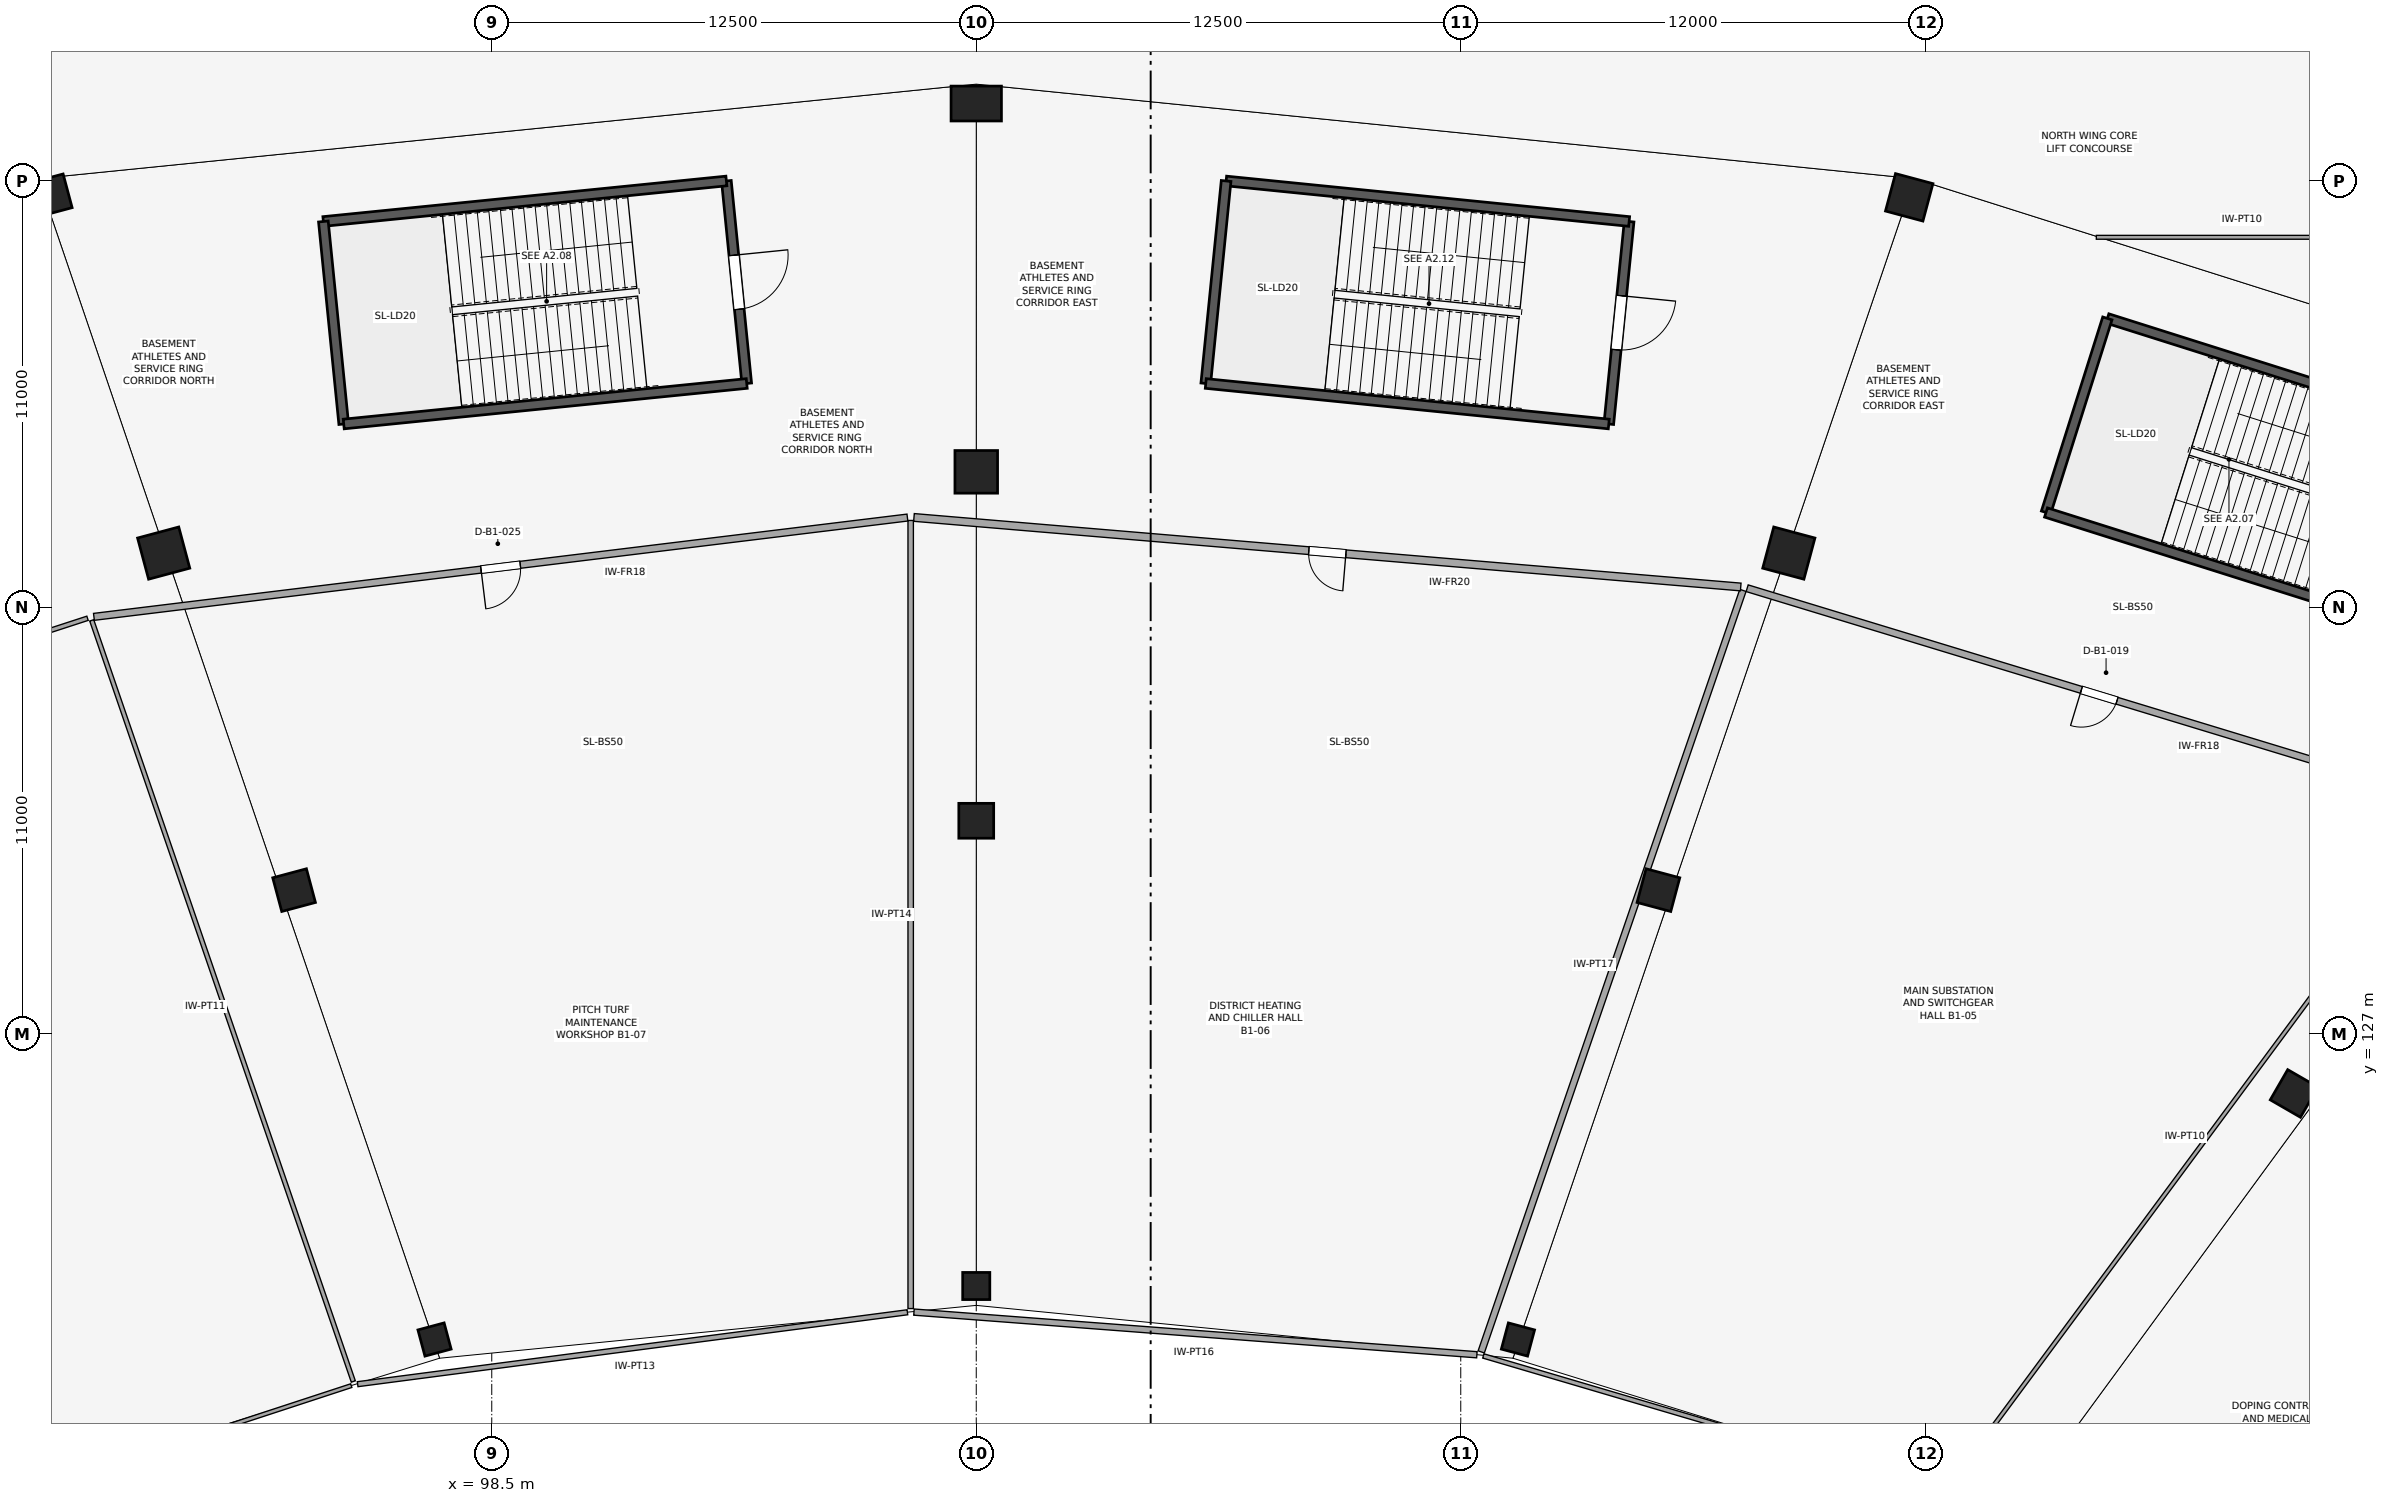
"""IFC4 building model, lengths in metres.
Left out: names, types, materials, properties, quantities, classifications, styles, units other than length and angle.
Written with IfcOpenShell. Run it as: python <this file> out.ifc"""

import sys

from ifc_helpers import new_model, si_unit, direction, frame, frame_2d, origin, origin_2d, place, context, subcontext, project, spatial, rectangle, extrude, element, fill, save


model = new_model("IFC4")
c1 = context("Model", 3, precision=1e-05, world=origin(), true_north=direction((0.0, 1.0)))
c2 = subcontext(c1, "Body", "Model", "MODEL_VIEW")
j1 = project(units=[si_unit("LENGTHUNIT", "METRE"), si_unit("PLANEANGLEUNIT", "RADIAN")], contexts=[c1])
p1 = place(None, origin())
s1 = spatial("IfcSite", under=j1, at=p1, CompositionType="ELEMENT")
p2 = place(p1, origin())
s2 = spatial("IfcBuilding", under=s1, at=p2, CompositionType="ELEMENT")
p3 = place(p2, frame((0.0, 0.0, -5.4)))
s3 = spatial("IfcBuildingStorey", under=s2, at=p3, CompositionType="ELEMENT", Elevation=-5.4)
for number, where, z_axis, x_axis in (
    (1, (124.976, 119.12, 0.0), (0.0, 0.0, 1.0), (0.259, 0.966, 0.0)),
    (2, (111.0, 120.5, 0.0), (0.0, 0.0, 1.0), (0.0, 1.0, 0.0)),
    (3, (97.024, 119.12, 0.0), (0.0, 0.0, 1.0), (-0.259, 0.966, 0.0)),
):
    element("IfcColumn", number, at=place(p3, frame(where, z_axis=z_axis, x_axis=x_axis)), inside=s3, PredefinedType="COLUMN", context=c2, shape_type="SweptSolid", body=[
        extrude(rectangle(XDim=0.7, YDim=0.7, at=origin_2d()), origin(), (0.0, 0.0, 1.0), 5.4),
    ])
for number, where, z_axis, x_axis in (
    (4, (145.0, 125.466, 0.0), (0.0, 0.0, 1.0), (0.5, 0.866, 0.0)),
    (5, (128.6, 130.711, 0.0), (0.0, 0.0, 1.0), (0.259, 0.966, 0.0)),
    (6, (111.0, 132.5, 0.0), (0.0, 0.0, 1.0), (0.0, 1.0, 0.0)),
    (7, (93.4, 130.711, 0.0), (0.0, 0.0, 1.0), (-0.259, 0.966, 0.0)),
):
    element("IfcColumn", number, at=place(p3, frame(where, z_axis=z_axis, x_axis=x_axis)), inside=s3, PredefinedType="COLUMN", context=c2, shape_type="SweptSolid", body=[
        extrude(rectangle(XDim=0.9, YDim=0.9, at=origin_2d()), origin(), (0.0, 0.0, 1.0), 5.4),
    ])
for number, where, z_axis, x_axis in (
    (8, (131.964, 139.404, 0.0), (0.0, 0.0, 1.0), (0.259, 0.966, 0.0)),
    (9, (111.0, 141.5, 0.0), (0.0, 0.0, 1.0), (0.0, 1.0, 0.0)),
    (10, (90.036, 139.404, 0.0), (0.0, 0.0, 1.0), (-0.259, 0.966, 0.0)),
):
    element("IfcColumn", number, at=place(p3, frame(where, z_axis=z_axis, x_axis=x_axis)), inside=s3, PredefinedType="COLUMN", context=c2, shape_type="SweptSolid", body=[
        extrude(rectangle(XDim=1.1, YDim=1.1, at=origin_2d()), origin(), (0.0, 0.0, 1.0), 5.4),
    ])
p4 = place(p3, frame((135.07, 148.581, 0.0), z_axis=(0.0, 0.0, 1.0), x_axis=(0.258819045103, 0.965925826289, 0.0)))
e11 = element("IfcColumn", 11, at=p4, inside=s3, PredefinedType="COLUMN", context=c2, shape_type="SweptSolid", body=[
    extrude(rectangle(XDim=1.0, YDim=1.0, at=origin_2d()), origin(), (0.0, 0.0, 1.0), 5.4),
])
for number, where, z_axis, x_axis in (
    (12, (111.0, 151.0, 0.0), (0.0, 0.0, 1.0), (0.0, 1.0, 0.0)),
    (13, (86.93, 148.581, 0.0), (0.0, 0.0, 1.0), (-0.259, 0.966, 0.0)),
):
    element("IfcColumn", number, at=place(p3, frame(where, z_axis=z_axis, x_axis=x_axis)), inside=s3, PredefinedType="COLUMN", context=c2, shape_type="SweptSolid", body=[
        extrude(rectangle(XDim=0.9, YDim=1.3, at=origin_2d()), origin(), (0.0, 0.0, 1.0), 5.4),
    ])
p5 = place(p3, frame((150.146, 142.307, 0.0), z_axis=(0.0, 0.0, 1.0), x_axis=(-0.953461834254, 0.301513732061, 0.0)))
e14 = element("IfcWall", 14, at=p5, inside=s3, PredefinedType="SHEAR", context=c2, shape_type="SweptSolid", body=[
    extrude(rectangle(XDim=10.45, YDim=0.25, at=frame_2d((5.225, 0.0))), origin(), (0.0, 0.0, 1.0), 5.05),
])
p6 = place(p3, frame((140.182, 145.458, 0.0), z_axis=(0.0, 0.0, 1.0), x_axis=(-0.301485222482, -0.953470849384, 0.0)))
e15 = element("IfcWall", 15, at=p6, inside=s3, PredefinedType="SHEAR", context=c2, shape_type="SweptSolid", body=[
    extrude(rectangle(XDim=5.25, YDim=0.25, at=frame_2d((2.625, 0.0))), origin(), (0.0, 0.0, 1.0), 5.05),
])
p7 = place(p3, frame((138.6, 140.452, 0.0), z_axis=(0.0, 0.0, 1.0), x_axis=(0.953459710305, -0.301520448438, 0.0)))
e16 = element("IfcWall", 16, at=p7, inside=s3, PredefinedType="SHEAR", context=c2, shape_type="SweptSolid", body=[
    extrude(rectangle(XDim=10.45, YDim=0.25, at=frame_2d((5.225, 0.0))), origin(), (0.0, 0.0, 1.0), 5.05),
])
p8 = place(p3, frame((105.079, 143.779, 0.0), z_axis=(0.0, 0.0, 1.0), x_axis=(-0.100028593886, 0.994984562898, 0.0)))
e17 = element("IfcWall", 17, at=p8, inside=s3, PredefinedType="SHEAR", context=c2, shape_type="SweptSolid", body=[
    extrude(rectangle(XDim=5.25, YDim=0.25, at=frame_2d((2.625, 0.0))), origin(), (0.0, 0.0, 1.0), 5.05),
])
p9 = place(p8, frame((1.925, 0.0, 0.0)))
e18 = element("IfcOpeningElement", 18, at=p9, cuts=e17, PredefinedType="OPENING", context=c2, shape_type="SweptSolid", body=[
    extrude(rectangle(XDim=1.4, YDim=2.2, at=frame_2d((0.7, 1.1))), frame((0.0, 0.135, 0.0), z_axis=(0.0, -1.0, 0.0), x_axis=(1.0, 0.0, 0.0)), (0.0, 0.0, 1.0), 0.27),
])
p10 = place(p3, frame((104.553, 149.003, 0.0), z_axis=(0.0, 0.0, 1.0), x_axis=(-0.994985938948, -0.100014905366, 0.0)))
e19 = element("IfcWall", 19, at=p10, inside=s3, PredefinedType="SHEAR", context=c2, shape_type="SweptSolid", body=[
    extrude(rectangle(XDim=10.45, YDim=0.25, at=frame_2d((5.225, 0.0))), origin(), (0.0, 0.0, 1.0), 5.05),
])
p11 = place(p3, frame((94.156, 147.958, 0.0), z_axis=(0.0, 0.0, 1.0), x_axis=(0.100028593886, -0.994984562898, 0.0)))
e20 = element("IfcWall", 20, at=p11, inside=s3, PredefinedType="SHEAR", context=c2, shape_type="SweptSolid", body=[
    extrude(rectangle(XDim=5.25, YDim=0.25, at=frame_2d((2.625, 0.0))), origin(), (0.0, 0.0, 1.0), 5.05),
])
p12 = place(p3, frame((94.681, 142.734, 0.0), z_axis=(0.0, 0.0, 1.0), x_axis=(0.994985938948, 0.100014905366, 0.0)))
e21 = element("IfcWall", 21, at=p12, inside=s3, PredefinedType="SHEAR", context=c2, shape_type="SweptSolid", body=[
    extrude(rectangle(XDim=10.45, YDim=0.25, at=frame_2d((5.225, 0.0))), origin(), (0.0, 0.0, 1.0), 5.05),
])
p13 = place(p3, frame((127.319, 142.734, 0.0), z_axis=(0.0, 0.0, 1.0), x_axis=(0.10002396577, 0.994985028165, 0.0)))
e22 = element("IfcWall", 22, at=p13, inside=s3, PredefinedType="SHEAR", context=c2, shape_type="SweptSolid", body=[
    extrude(rectangle(XDim=5.25, YDim=0.25, at=frame_2d((2.625, 0.0))), origin(), (0.0, 0.0, 1.0), 5.05),
])
p14 = place(p13, frame((1.925, 0.0, 0.0)))
e23 = element("IfcOpeningElement", 23, at=p14, cuts=e22, PredefinedType="OPENING", context=c2, shape_type="SweptSolid", body=[
    extrude(rectangle(XDim=1.4, YDim=2.2, at=frame_2d((0.7, 1.1))), frame((0.0, 0.135, 0.0), z_axis=(0.0, -1.0, 0.0), x_axis=(1.0, 0.0, 0.0)), (0.0, 0.0, 1.0), 0.27),
])
p15 = place(p3, frame((127.844, 147.958, 0.0), z_axis=(0.0, 0.0, 1.0), x_axis=(-0.994988263568, 0.09999177647, 0.0)))
e24 = element("IfcWall", 24, at=p15, inside=s3, PredefinedType="SHEAR", context=c2, shape_type="SweptSolid", body=[
    extrude(rectangle(XDim=10.45, YDim=0.25, at=frame_2d((5.225, 0.0))), origin(), (0.0, 0.0, 1.0), 5.05),
])
p16 = place(p3, frame((117.447, 149.003, 0.0), z_axis=(0.0, 0.0, 1.0), x_axis=(-0.099982555566, -0.994989190184, 0.0)))
e25 = element("IfcWall", 25, at=p16, inside=s3, PredefinedType="SHEAR", context=c2, shape_type="SweptSolid", body=[
    extrude(rectangle(XDim=5.25, YDim=0.25, at=frame_2d((2.625, 0.0))), origin(), (0.0, 0.0, 1.0), 5.05),
])
p17 = place(p3, frame((116.922, 143.779, 0.0), z_axis=(0.0, 0.0, 1.0), x_axis=(0.994985705245, -0.100017230303, 0.0)))
e26 = element("IfcWall", 26, at=p17, inside=s3, PredefinedType="SHEAR", context=c2, shape_type="SweptSolid", body=[
    extrude(rectangle(XDim=10.45, YDim=0.25, at=frame_2d((5.225, 0.0))), origin(), (0.0, 0.0, 1.0), 5.05),
])
p18 = place(p3, frame((136.033, 115.257, 0.0), z_axis=(0.0, 0.0, 1.0), x_axis=(0.595115459559, 0.803640211658, 0.0)))
e27 = element("IfcWall", 27, at=p18, inside=s3, PredefinedType="PARTITIONING", context=c2, shape_type="SweptSolid", body=[
    extrude(rectangle(XDim=21.93, YDim=0.1, at=frame_2d((10.965, 0.0))), origin(), (0.0, 0.0, 1.0), 3.8),
])
p19 = place(p3, frame((135.901, 115.212, 0.0), z_axis=(0.0, 0.0, 1.0), x_axis=(-0.959194951666, 0.28274554762, 0.0)))
e28 = element("IfcWall", 28, at=p19, inside=s3, PredefinedType="MOVABLE", context=c2, shape_type="SweptSolid", body=[
    extrude(rectangle(XDim=12.322, YDim=0.115, at=frame_2d((6.161, 0.0))), origin(), (0.0, 0.0, 1.0), 3.8),
])
p20 = place(p3, frame((149.054, 132.973, 0.0), z_axis=(0.0, 0.0, 1.0), x_axis=(-0.956723233709, 0.290999405637, 0.0)))
e29 = element("IfcWall", 29, at=p20, inside=s3, PredefinedType="PARTITIONING", context=c2, shape_type="SweptSolid", body=[
    extrude(rectangle(XDim=18.986, YDim=0.18, at=frame_2d((9.493, 0.0))), origin(), (0.0, 0.0, 1.0), 3.8),
])
p21 = place(p20, frame((9.013, 0.0, 0.0)))
e30 = element("IfcOpeningElement", 30, at=p21, cuts=e29, PredefinedType="OPENING", context=c2, shape_type="SweptSolid", body=[
    extrude(rectangle(XDim=0.96, YDim=2.1, at=frame_2d((0.48, 1.05))), frame((0.0, 0.1, 0.0), z_axis=(0.0, -1.0, 0.0), x_axis=(1.0, 0.0, 0.0)), (0.0, 0.0, 1.0), 0.2),
])
p22 = place(p3, frame((124.029, 118.801, 0.0), z_axis=(0.0, 0.0, 1.0), x_axis=(0.325086338783, 0.945684340748, 0.0)))
e31 = element("IfcWall", 31, at=p22, inside=s3, PredefinedType="PARTITIONING", context=c2, shape_type="SweptSolid", body=[
    extrude(rectangle(XDim=20.77, YDim=0.17, at=frame_2d((10.385, 0.0))), origin(), (0.0, 0.0, 1.0), 3.8),
])
p23 = place(p3, frame((123.916, 118.727, 0.0), z_axis=(0.0, 0.0, 1.0), x_axis=(-0.997142075801, 0.075549193687, 0.0)))
e32 = element("IfcWall", 32, at=p23, inside=s3, PredefinedType="PARTITIONING", context=c2, shape_type="SweptSolid", body=[
    extrude(rectangle(XDim=14.564, YDim=0.16, at=frame_2d((7.282, 0.0))), origin(), (0.0, 0.0, 1.0), 3.8),
])
p24 = place(p3, frame((130.723, 138.53, 0.0), z_axis=(0.0, 0.0, 1.0), x_axis=(-0.996481037388, 0.083818507065, 0.0)))
e33 = element("IfcWall", 33, at=p24, inside=s3, PredefinedType="PARTITIONING", context=c2, shape_type="SweptSolid", body=[
    extrude(rectangle(XDim=21.406, YDim=0.2, at=frame_2d((10.703, 0.0))), origin(), (0.0, 0.0, 1.0), 3.8),
])
p25 = place(p24, frame((10.223, 0.0, 0.0)))
e34 = element("IfcOpeningElement", 34, at=p25, cuts=e33, PredefinedType="OPENING", context=c2, shape_type="SweptSolid", body=[
    extrude(rectangle(XDim=0.96, YDim=2.38, at=frame_2d((0.48, 1.19))), frame((0.0, 0.11, 0.0), z_axis=(0.0, -1.0, 0.0), x_axis=(1.0, 0.0, 0.0)), (0.0, 0.0, 1.0), 0.22),
])
p26 = place(p3, frame((109.308, 119.918, 0.0), z_axis=(0.0, 0.0, 1.0), x_axis=(1.2010281e-05, 0.999999999928, 0.0)))
e35 = element("IfcWall", 35, at=p26, inside=s3, PredefinedType="PARTITIONING", context=c2, shape_type="SweptSolid", body=[
    extrude(rectangle(XDim=20.328, YDim=0.14, at=frame_2d((10.164, 0.0))), origin(), (0.0, 0.0, 1.0), 3.8),
])
p27 = place(p3, frame((109.224, 119.823, 0.0), z_axis=(0.0, 0.0, 1.0), x_axis=(-0.991556002657, -0.129679194922, 0.0)))
e36 = element("IfcWall", 36, at=p27, inside=s3, PredefinedType="PARTITIONING", context=c2, shape_type="SweptSolid", body=[
    extrude(rectangle(XDim=14.304, YDim=0.13, at=frame_2d((7.152, 0.0))), origin(), (0.0, 0.0, 1.0), 3.8),
])
p28 = place(p3, frame((109.224, 140.321, 0.0), z_axis=(0.0, 0.0, 1.0), x_axis=(-0.992637076034, -0.121126525924, 0.0)))
e37 = element("IfcWall", 37, at=p28, inside=s3, PredefinedType="PARTITIONING", context=c2, shape_type="SweptSolid", body=[
    extrude(rectangle(XDim=21.144, YDim=0.18, at=frame_2d((10.572, 0.0))), origin(), (0.0, 0.0, 1.0), 3.8),
])
p29 = place(p28, frame((10.062, 0.0, 0.0)))
e38 = element("IfcOpeningElement", 38, at=p29, cuts=e37, PredefinedType="OPENING", context=c2, shape_type="SweptSolid", body=[
    extrude(rectangle(XDim=1.02, YDim=2.24, at=frame_2d((0.51, 1.12))), frame((0.0, 0.1, 0.0), z_axis=(0.0, -1.0, 0.0), x_axis=(1.0, 0.0, 0.0)), (0.0, 0.0, 1.0), 0.2),
])
p30 = place(p3, frame((94.928, 118.037, 0.0), z_axis=(0.0, 0.0, 1.0), x_axis=(-0.325104747712, 0.945678012336, 0.0)))
e39 = element("IfcWall", 39, at=p30, inside=s3, PredefinedType="PARTITIONING", context=c2, shape_type="SweptSolid", body=[
    extrude(rectangle(XDim=20.76, YDim=0.11, at=frame_2d((10.38, 0.0))), origin(), (0.0, 0.0, 1.0), 3.8),
])
p31 = place(p3, frame((94.875, 117.93, 0.0), z_axis=(0.0, 0.0, 1.0), x_axis=(-0.950291262804, -0.311362354561, 0.0)))
e40 = element("IfcWall", 40, at=p31, inside=s3, PredefinedType="PARTITIONING", context=c2, shape_type="SweptSolid", body=[
    extrude(rectangle(XDim=11.918, YDim=0.1, at=frame_2d((5.959, 0.0))), origin(), (0.0, 0.0, 1.0), 3.8),
])
p32 = place(p3, frame((88.071, 137.723, 0.0), z_axis=(0.0, 0.0, 1.0), x_axis=(-0.950832746892, -0.309704839223, 0.0)))
e41 = element("IfcWall", 41, at=p32, inside=s3, PredefinedType="MOVABLE", context=c2, shape_type="SweptSolid", body=[
    extrude(rectangle(XDim=18.582, YDim=0.115, at=frame_2d((9.291, 0.0))), origin(), (0.0, 0.0, 1.0), 3.8),
])
p33 = place(p32, frame((8.781, 0.0, 0.0)))
e42 = element("IfcOpeningElement", 42, at=p33, cuts=e41, PredefinedType="OPENING", context=c2, shape_type="SweptSolid", body=[
    extrude(rectangle(XDim=1.02, YDim=2.1, at=frame_2d((0.51, 1.05))), frame((0.0, 0.067, 0.0), z_axis=(0.0, -1.0, 0.0), x_axis=(1.0, 0.0, 0.0)), (0.0, 0.0, 1.0), 0.135),
])
p34 = place(p3, frame((139.898, 147.55, 0.0), z_axis=(0.0, 0.0, 1.0), x_axis=(1.0, 0.0, 0.0)))
e43 = element("IfcWall", 43, at=p34, inside=s3, PredefinedType="PARTITIONING", context=c2, shape_type="SweptSolid", body=[
    extrude(rectangle(XDim=7.517, YDim=0.1, at=frame_2d((3.759, 0.0))), origin(), (0.0, 0.0, 1.0), 3.8),
])
p35 = place(p9, frame((1.4, 0.0, 0.0), z_axis=(0.0, 0.0, 1.0), x_axis=(-1.0, 0.0, 0.0)))
e44 = element("IfcDoor", 44, at=p35, inside=s3, OperationType="SINGLE_SWING_LEFT", PredefinedType="DOOR", context=c2, shape_type="SweptSolid", body=[
    extrude(rectangle(XDim=1.4, YDim=2.2, at=frame_2d((0.7, 1.1))), frame((0.0, 0.025, 0.0), z_axis=(0.0, -1.0, 0.0), x_axis=(1.0, 0.0, 0.0)), (0.0, 0.0, 1.0), 0.05),
])
fill(e18, e44)
p36 = place(p14, frame((1.4, 0.0, 0.0), z_axis=(0.0, 0.0, 1.0), x_axis=(-1.0, 0.0, 0.0)))
e45 = element("IfcDoor", 45, at=p36, inside=s3, OperationType="SINGLE_SWING_LEFT", PredefinedType="DOOR", context=c2, shape_type="SweptSolid", body=[
    extrude(rectangle(XDim=1.4, YDim=2.2, at=frame_2d((0.7, 1.1))), frame((0.0, 0.025, 0.0), z_axis=(0.0, -1.0, 0.0), x_axis=(1.0, 0.0, 0.0)), (0.0, 0.0, 1.0), 0.05),
])
fill(e23, e45)
p37 = place(p21, origin())
e46 = element("IfcDoor", 46, at=p37, inside=s3, OperationType="SINGLE_SWING_RIGHT", PredefinedType="DOOR", context=c2, shape_type="SweptSolid", body=[
    extrude(rectangle(XDim=0.96, YDim=2.1, at=frame_2d((0.48, 1.05))), frame((0.0, 0.025, 0.0), z_axis=(0.0, -1.0, 0.0), x_axis=(1.0, 0.0, 0.0)), (0.0, 0.0, 1.0), 0.05),
])
fill(e30, e46)
p38 = place(p25, origin())
e47 = element("IfcDoor", 47, at=p38, inside=s3, OperationType="SINGLE_SWING_LEFT", PredefinedType="DOOR", context=c2, shape_type="SweptSolid", body=[
    extrude(rectangle(XDim=0.96, YDim=2.38, at=frame_2d((0.48, 1.19))), frame((0.0, 0.025, 0.0), z_axis=(0.0, -1.0, 0.0), x_axis=(1.0, 0.0, 0.0)), (0.0, 0.0, 1.0), 0.05),
])
fill(e34, e47)
p39 = place(p29, origin())
e48 = element("IfcDoor", 48, at=p39, inside=s3, OperationType="SINGLE_SWING_RIGHT", PredefinedType="DOOR", context=c2, shape_type="SweptSolid", body=[
    extrude(rectangle(XDim=1.02, YDim=2.24, at=frame_2d((0.51, 1.12))), frame((0.0, 0.025, 0.0), z_axis=(0.0, -1.0, 0.0), x_axis=(1.0, 0.0, 0.0)), (0.0, 0.0, 1.0), 0.05),
])
fill(e38, e48)
save(model, sys.argv[1])
